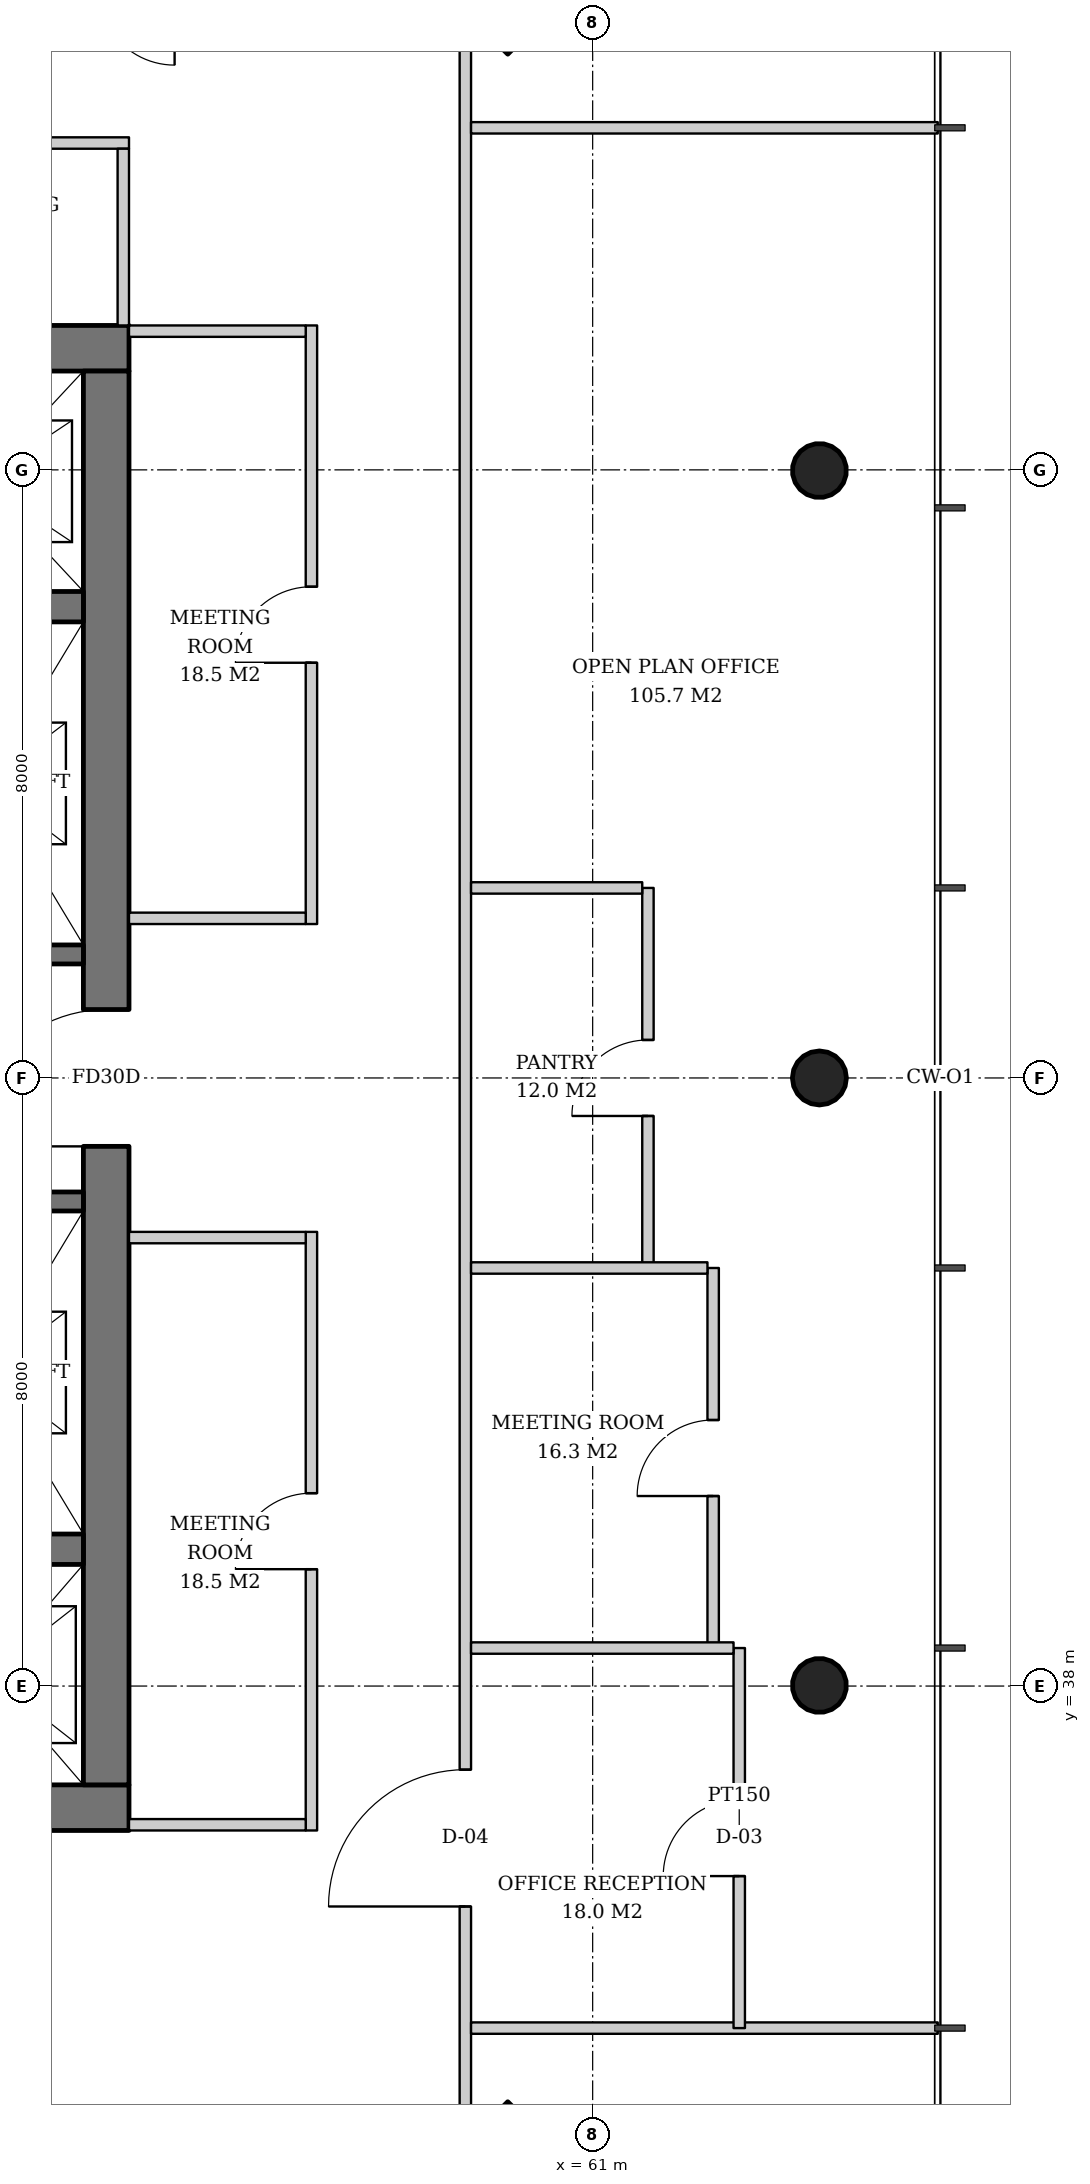
"""IFC4 building model, lengths in metres.
Left out: names, types, materials, properties, quantities, classifications, styles, units other than length and angle.
Written with IfcOpenShell. Run it as: python <this file> out.ifc"""

import sys

from ifc_helpers import new_model, si_unit, direction, frame, frame_2d, origin, origin_2d, place, context, subcontext, project, spatial, rectangle, hollow_circle, extrude, element, fill, save


model = new_model("IFC4")
c1 = context("Model", 3, precision=1e-05, world=origin(), true_north=direction((0.0, 1.0)))
c2 = subcontext(c1, "Body", "Model", "MODEL_VIEW")
j1 = project(units=[si_unit("LENGTHUNIT", "METRE"), si_unit("PLANEANGLEUNIT", "RADIAN")], contexts=[c1])
p1 = place(None, origin())
s1 = spatial("IfcSite", under=j1, at=p1, CompositionType="ELEMENT")
p2 = place(p1, origin())
s2 = spatial("IfcBuilding", under=s1, at=p2, CompositionType="ELEMENT")
p3 = place(p2, frame((0.0, 0.0, 176.8)))
s3 = spatial("IfcBuildingStorey", under=s2, at=p3, CompositionType="ELEMENT", Elevation=176.8)
p4 = place(p3, frame((59.921, 60.921, 0.0), z_axis=(-0.031898107953, -0.031898107953, 0.998981992539), x_axis=(0.707106781187, -0.707106781187, 0.0)))
e1 = element("IfcColumn", 1, at=p4, inside=s3, PredefinedType="COLUMN", context=c2, shape_type="SweptSolid", body=[
    extrude(rectangle(XDim=2.0, YDim=2.0, at=origin_2d()), origin(), (0.0, 0.0, 1.0), 3.804),
])
p5 = place(p3, frame((64.021, 37.989, 0.0), z_axis=(-0.031974409754, 0.015987204877, 0.999360818924), x_axis=(-0.4472135955, -0.894427191, 0.0)))
e2 = element("IfcColumn", 2, at=p5, inside=s3, PredefinedType="COLUMN", context=c2, shape_type="SweptSolid", body=[
    extrude(hollow_circle(Radius=0.355, WallThickness=0.025, at=origin_2d()), origin(), (0.0, 0.0, 1.0), 3.802),
])
p6 = place(p3, frame((64.021, 46.0, 0.0), z_axis=(-0.031978496719, 0.0, 0.999488557087), x_axis=(0.0, -1.0, 0.0)))
e3 = element("IfcColumn", 3, at=p6, inside=s3, PredefinedType="COLUMN", context=c2, shape_type="SweptSolid", body=[
    extrude(hollow_circle(Radius=0.355, WallThickness=0.025, at=origin_2d()), origin(), (0.0, 0.0, 1.0), 3.802),
])
p7 = place(p3, frame((64.021, 54.011, 0.0), z_axis=(-0.031974409754, -0.015987204877, 0.999360818924), x_axis=(0.4472135955, -0.894427191, 0.0)))
e4 = element("IfcColumn", 4, at=p7, inside=s3, PredefinedType="COLUMN", context=c2, shape_type="SweptSolid", body=[
    extrude(hollow_circle(Radius=0.355, WallThickness=0.025, at=origin_2d()), origin(), (0.0, 0.0, 1.0), 3.802),
])
p8 = place(p3, frame((59.921, 31.079, 0.0), z_axis=(-0.031898107953, 0.031898107953, 0.998981992539), x_axis=(-0.707106781187, -0.707106781187, 0.0)))
e5 = element("IfcColumn", 5, at=p8, inside=s3, PredefinedType="COLUMN", context=c2, shape_type="SweptSolid", body=[
    extrude(rectangle(XDim=2.0, YDim=2.0, at=origin_2d()), origin(), (0.0, 0.0, 1.0), 3.804),
])
p9 = place(p3, frame((35.1, 36.4, 0.0), z_axis=(0.0, 0.0, 1.0), x_axis=(1.0, 0.0, 0.0)))
e6 = element("IfcWall", 6, at=p9, inside=s3, PredefinedType="SHEAR", context=c2, shape_type="SweptSolid", body=[
    extrude(rectangle(XDim=19.8, YDim=0.6, at=frame_2d((9.9, 0.0))), origin(), (0.0, 0.0, 1.0), 3.8),
])
p10 = place(p9, frame((3.9, 0.0, 0.0)))
e7 = element("IfcOpeningElement", 7, at=p10, cuts=e6, PredefinedType="OPENING", context=c2, shape_type="SweptSolid", body=[
    extrude(rectangle(XDim=1.0, YDim=2.1, at=frame_2d((0.5, 1.05))), frame((0.0, 0.31, 0.0), z_axis=(0.0, -1.0, 0.0), x_axis=(1.0, 0.0, 0.0)), (0.0, 0.0, 1.0), 0.62),
])
p11 = place(p9, frame((15.35, 0.0, 0.0)))
e8 = element("IfcOpeningElement", 8, at=p11, cuts=e6, PredefinedType="OPENING", context=c2, shape_type="SweptSolid", body=[
    extrude(rectangle(XDim=1.0, YDim=2.1, at=frame_2d((0.5, 1.05))), frame((0.0, 0.31, 0.0), z_axis=(0.0, -1.0, 0.0), x_axis=(1.0, 0.0, 0.0)), (0.0, 0.0, 1.0), 0.62),
])
p12 = place(p3, frame((35.1, 55.6, 0.0), z_axis=(0.0, 0.0, 1.0), x_axis=(1.0, 0.0, 0.0)))
e9 = element("IfcWall", 9, at=p12, inside=s3, PredefinedType="SHEAR", context=c2, shape_type="SweptSolid", body=[
    extrude(rectangle(XDim=19.8, YDim=0.6, at=frame_2d((9.9, 0.0))), origin(), (0.0, 0.0, 1.0), 3.8),
])
p13 = place(p12, frame((14.54, 0.0, 0.0)))
e10 = element("IfcOpeningElement", 10, at=p13, cuts=e9, PredefinedType="OPENING", context=c2, shape_type="SweptSolid", body=[
    extrude(rectangle(XDim=1.0, YDim=2.1, at=frame_2d((0.5, 1.05))), frame((0.0, 0.31, 0.0), z_axis=(0.0, -1.0, 0.0), x_axis=(1.0, 0.0, 0.0)), (0.0, 0.0, 1.0), 0.62),
])
p14 = place(p12, frame((1.024, 0.0, 0.0)))
e11 = element("IfcOpeningElement", 11, at=p14, cuts=e9, PredefinedType="OPENING", context=c2, shape_type="SweptSolid", body=[
    extrude(rectangle(XDim=1.0, YDim=2.1, at=frame_2d((0.5, 1.05))), frame((0.0, 0.31, 0.0), z_axis=(0.0, -1.0, 0.0), x_axis=(1.0, 0.0, 0.0)), (0.0, 0.0, 1.0), 0.62),
])
p15 = place(p12, frame((3.262, 0.0, 0.0)))
e12 = element("IfcOpeningElement", 12, at=p15, cuts=e9, PredefinedType="OPENING", context=c2, shape_type="SweptSolid", body=[
    extrude(rectangle(XDim=1.0, YDim=2.1, at=frame_2d((0.5, 1.05))), frame((0.0, 0.31, 0.0), z_axis=(0.0, -1.0, 0.0), x_axis=(1.0, 0.0, 0.0)), (0.0, 0.0, 1.0), 0.62),
])
p16 = place(p3, frame((54.6, 36.7, 0.0), z_axis=(0.0, 0.0, 1.0), x_axis=(0.0, 1.0, 0.0)))
e13 = element("IfcWall", 13, at=p16, inside=s3, PredefinedType="SHEAR", context=c2, shape_type="SweptSolid", body=[
    extrude(rectangle(XDim=18.6, YDim=0.6, at=frame_2d((9.3, 0.0))), origin(), (0.0, 0.0, 1.0), 3.8),
])
p17 = place(p16, frame((8.4, 0.0, 0.0)))
e14 = element("IfcOpeningElement", 14, at=p17, cuts=e13, PredefinedType="OPENING", context=c2, shape_type="SweptSolid", body=[
    extrude(rectangle(XDim=1.8, YDim=2.4, at=frame_2d((0.9, 1.2))), frame((0.0, 0.31, 0.0), z_axis=(0.0, -1.0, 0.0), x_axis=(1.0, 0.0, 0.0)), (0.0, 0.0, 1.0), 0.62),
])
for number, where, z_axis, x_axis in (
    (15, (35.7, 39.8, 0.0), (0.0, 0.0, 1.0), (1.0, 0.0, 0.0)),
    (16, (35.7, 52.2, 0.0), (0.0, 0.0, 1.0), (1.0, 0.0, 0.0)),
):
    element("IfcWall", number, at=place(p3, frame(where, z_axis=z_axis, x_axis=x_axis)), inside=s3, PredefinedType="SHEAR", context=c2, shape_type="SweptSolid", body=[
        extrude(rectangle(XDim=18.6, YDim=0.4, at=frame_2d((9.3, 0.0))), origin(), (0.0, 0.0, 1.0), 3.8),
    ])
for number, where, z_axis, x_axis in (
    (17, (48.93, 47.625, 0.0), (0.0, 0.0, 1.0), (1.0, 0.0, 0.0)),
    (18, (48.93, 44.375, 0.0), (0.0, 0.0, 1.0), (1.0, 0.0, 0.0)),
):
    element("IfcWall", number, at=place(p3, frame(where, z_axis=z_axis, x_axis=x_axis)), inside=s3, PredefinedType="SHEAR", context=c2, shape_type="SweptSolid", body=[
        extrude(rectangle(XDim=5.37, YDim=0.25, at=frame_2d((2.685, 0.0))), origin(), (0.0, 0.0, 1.0), 3.8),
    ])
p18 = place(p3, frame((57.3, 36.1, 0.0), z_axis=(0.0, 0.0, 1.0), x_axis=(0.0, 1.0, 0.0)))
e19 = element("IfcWall", 19, at=p18, inside=s3, PredefinedType="PARTITIONING", context=c2, shape_type="SweptSolid", body=[
    extrude(rectangle(XDim=7.875, YDim=0.15, at=frame_2d((3.938, 0.0))), origin(), (0.0, 0.0, 1.0), 2.867),
])
p19 = place(p18, frame((3.438, 0.0, 0.0)))
e20 = element("IfcOpeningElement", 20, at=p19, cuts=e19, PredefinedType="OPENING", context=c2, shape_type="SweptSolid", body=[
    extrude(rectangle(XDim=1.0, YDim=2.1, at=frame_2d((0.5, 1.05))), frame((0.0, 0.085, 0.0), z_axis=(0.0, -1.0, 0.0), x_axis=(1.0, 0.0, 0.0)), (0.0, 0.0, 1.0), 0.17),
])
p20 = place(p3, frame((54.9, 36.175, 0.0), z_axis=(0.0, 0.0, 1.0), x_axis=(1.0, 0.0, 0.0)))
e21 = element("IfcWall", 21, at=p20, inside=s3, PredefinedType="PARTITIONING", context=c2, shape_type="SweptSolid", body=[
    extrude(rectangle(XDim=2.325, YDim=0.15, at=frame_2d((1.163, 0.0))), origin(), (0.0, 0.0, 1.0), 2.867),
])
p21 = place(p3, frame((54.9, 43.9, 0.0), z_axis=(0.0, 0.0, 1.0), x_axis=(1.0, 0.0, 0.0)))
e22 = element("IfcWall", 22, at=p21, inside=s3, PredefinedType="PARTITIONING", context=c2, shape_type="SweptSolid", body=[
    extrude(rectangle(XDim=2.325, YDim=0.15, at=frame_2d((1.163, 0.0))), origin(), (0.0, 0.0, 1.0), 3.62),
])
p22 = place(p3, frame((57.3, 48.025, 0.0), z_axis=(0.0, 0.0, 1.0), x_axis=(0.0, 1.0, 0.0)))
e23 = element("IfcWall", 23, at=p22, inside=s3, PredefinedType="PARTITIONING", context=c2, shape_type="SweptSolid", body=[
    extrude(rectangle(XDim=7.875, YDim=0.15, at=frame_2d((3.938, 0.0))), origin(), (0.0, 0.0, 1.0), 2.867),
])
p23 = place(p22, frame((3.438, 0.0, 0.0)))
e24 = element("IfcOpeningElement", 24, at=p23, cuts=e23, PredefinedType="OPENING", context=c2, shape_type="SweptSolid", body=[
    extrude(rectangle(XDim=1.0, YDim=2.1, at=frame_2d((0.5, 1.05))), frame((0.0, 0.085, 0.0), z_axis=(0.0, -1.0, 0.0), x_axis=(1.0, 0.0, 0.0)), (0.0, 0.0, 1.0), 0.17),
])
for number, where, z_axis, x_axis in (
    (25, (54.9, 48.1, 0.0), (0.0, 0.0, 1.0), (1.0, 0.0, 0.0)),
    (26, (54.9, 55.825, 0.0), (0.0, 0.0, 1.0), (1.0, 0.0, 0.0)),
):
    element("IfcWall", number, at=place(p3, frame(where, z_axis=z_axis, x_axis=x_axis)), inside=s3, PredefinedType="PARTITIONING", context=c2, shape_type="SweptSolid", body=[
        extrude(rectangle(XDim=2.325, YDim=0.15, at=frame_2d((1.163, 0.0))), origin(), (0.0, 0.0, 1.0), 3.62),
    ])
p24 = place(p3, frame((54.9, 58.3, 0.0), z_axis=(0.0, 0.0, 1.0), x_axis=(-1.0, 0.0, 0.0)))
e27 = element("IfcWall", 27, at=p24, inside=s3, PredefinedType="PARTITIONING", context=c2, shape_type="SweptSolid", body=[
    extrude(rectangle(XDim=3.135, YDim=0.15, at=frame_2d((1.567, 0.0))), origin(), (0.0, 0.0, 1.0), 2.92),
])
p25 = place(p24, frame((1.067, 0.0, 0.0)))
e28 = element("IfcOpeningElement", 28, at=p25, cuts=e27, PredefinedType="OPENING", context=c2, shape_type="SweptSolid", body=[
    extrude(rectangle(XDim=1.0, YDim=2.1, at=frame_2d((0.5, 1.05))), frame((0.0, 0.085, 0.0), z_axis=(0.0, -1.0, 0.0), x_axis=(1.0, 0.0, 0.0)), (0.0, 0.0, 1.0), 0.17),
])
p26 = place(p3, frame((54.825, 55.9, 0.0), z_axis=(0.0, 0.0, 1.0), x_axis=(0.0, 1.0, 0.0)))
e29 = element("IfcWall", 29, at=p26, inside=s3, PredefinedType="PARTITIONING", context=c2, shape_type="SweptSolid", body=[
    extrude(rectangle(XDim=2.325, YDim=0.15, at=frame_2d((1.163, 0.0))), origin(), (0.0, 0.0, 1.0), 2.867),
])
p27 = place(p3, frame((59.325, 32.214, 0.0), z_axis=(0.0, 0.0, 1.0), x_axis=(0.0, 1.0, 0.0)))
e30 = element("IfcWall", 30, at=p27, inside=s3, PredefinedType="PARTITIONING", context=c2, shape_type="SweptSolid", body=[
    extrude(rectangle(XDim=27.572, YDim=0.15, at=frame_2d((13.786, 0.0))), origin(), (0.0, 0.0, 1.0), 2.867),
])
p28 = place(p27, frame((2.886, 0.0, 0.0)))
e31 = element("IfcOpeningElement", 31, at=p28, cuts=e30, PredefinedType="OPENING", context=c2, shape_type="SweptSolid", body=[
    extrude(rectangle(XDim=1.8, YDim=2.4, at=frame_2d((0.9, 1.2))), frame((0.0, 0.085, 0.0), z_axis=(0.0, -1.0, 0.0), x_axis=(1.0, 0.0, 0.0)), (0.0, 0.0, 1.0), 0.17),
])
for number, where, z_axis, x_axis in (
    (32, (59.4, 33.5, 0.0), (0.0, 0.0, 1.0), (1.0, 0.0, 0.0)),
    (33, (59.4, 58.5, 0.0), (0.0, 0.0, 1.0), (1.0, 0.0, 0.0)),
):
    element("IfcWall", number, at=place(p3, frame(where, z_axis=z_axis, x_axis=x_axis)), inside=s3, PredefinedType="PARTITIONING", context=c2, shape_type="SweptSolid", body=[
        extrude(rectangle(XDim=6.14, YDim=0.15, at=frame_2d((3.07, 0.0))), origin(), (0.0, 0.0, 1.0), 3.12),
    ])
p29 = place(p3, frame((62.928, 33.5, 0.0), z_axis=(0.0, 0.0, 1.0), x_axis=(0.0, 1.0, 0.0)))
e34 = element("IfcWall", 34, at=p29, inside=s3, PredefinedType="PARTITIONING", context=c2, shape_type="SweptSolid", body=[
    extrude(rectangle(XDim=5.0, YDim=0.15, at=frame_2d((2.5, 0.0))), origin(), (0.0, 0.0, 1.0), 2.92),
])
p30 = place(p29, frame((2.0, 0.0, 0.0)))
e35 = element("IfcOpeningElement", 35, at=p30, cuts=e34, PredefinedType="OPENING", context=c2, shape_type="SweptSolid", body=[
    extrude(rectangle(XDim=1.0, YDim=2.1, at=frame_2d((0.5, 1.05))), frame((0.0, 0.085, 0.0), z_axis=(0.0, -1.0, 0.0), x_axis=(1.0, 0.0, 0.0)), (0.0, 0.0, 1.0), 0.17),
])
p31 = place(p3, frame((62.585, 38.5, 0.0), z_axis=(0.0, 0.0, 1.0), x_axis=(0.0, 1.0, 0.0)))
e36 = element("IfcWall", 36, at=p31, inside=s3, PredefinedType="PARTITIONING", context=c2, shape_type="SweptSolid", body=[
    extrude(rectangle(XDim=5.0, YDim=0.15, at=frame_2d((2.5, 0.0))), origin(), (0.0, 0.0, 1.0), 2.867),
])
p32 = place(p31, frame((2.0, 0.0, 0.0)))
e37 = element("IfcOpeningElement", 37, at=p32, cuts=e36, PredefinedType="OPENING", context=c2, shape_type="SweptSolid", body=[
    extrude(rectangle(XDim=1.0, YDim=2.1, at=frame_2d((0.5, 1.05))), frame((0.0, 0.085, 0.0), z_axis=(0.0, -1.0, 0.0), x_axis=(1.0, 0.0, 0.0)), (0.0, 0.0, 1.0), 0.17),
])
p33 = place(p3, frame((61.727, 43.5, 0.0), z_axis=(0.0, 0.0, 1.0), x_axis=(0.0, 1.0, 0.0)))
e38 = element("IfcWall", 38, at=p33, inside=s3, PredefinedType="PARTITIONING", context=c2, shape_type="SweptSolid", body=[
    extrude(rectangle(XDim=5.0, YDim=0.15, at=frame_2d((2.5, 0.0))), origin(), (0.0, 0.0, 1.0), 2.867),
])
p34 = place(p33, frame((2.0, 0.0, 0.0)))
e39 = element("IfcOpeningElement", 39, at=p34, cuts=e38, PredefinedType="OPENING", context=c2, shape_type="SweptSolid", body=[
    extrude(rectangle(XDim=1.0, YDim=2.1, at=frame_2d((0.5, 1.05))), frame((0.0, 0.085, 0.0), z_axis=(0.0, -1.0, 0.0), x_axis=(1.0, 0.0, 0.0)), (0.0, 0.0, 1.0), 0.17),
])
p35 = place(p3, frame((59.4, 38.5, 0.0), z_axis=(0.0, 0.0, 1.0), x_axis=(1.0, 0.0, 0.0)))
e40 = element("IfcWall", 40, at=p35, inside=s3, PredefinedType="PARTITIONING", context=c2, shape_type="SweptSolid", body=[
    extrude(rectangle(XDim=3.454, YDim=0.15, at=frame_2d((1.727, 0.0))), origin(), (0.0, 0.0, 1.0), 3.62),
])
p36 = place(p3, frame((59.4, 43.5, 0.0), z_axis=(0.0, 0.0, 1.0), x_axis=(1.0, 0.0, 0.0)))
e41 = element("IfcWall", 41, at=p36, inside=s3, PredefinedType="PARTITIONING", context=c2, shape_type="SweptSolid", body=[
    extrude(rectangle(XDim=3.11, YDim=0.15, at=frame_2d((1.555, 0.0))), origin(), (0.0, 0.0, 1.0), 3.62),
])
p37 = place(p3, frame((59.4, 48.5, 0.0), z_axis=(0.0, 0.0, 1.0), x_axis=(1.0, 0.0, 0.0)))
e42 = element("IfcWall", 42, at=p37, inside=s3, PredefinedType="PARTITIONING", context=c2, shape_type="SweptSolid", body=[
    extrude(rectangle(XDim=2.252, YDim=0.15, at=frame_2d((1.126, 0.0))), origin(), (0.0, 0.0, 1.0), 2.867),
])
p38 = place(p17, origin())
e43 = element("IfcDoor", 43, at=p38, inside=s3, OperationType="DOUBLE_DOOR_SINGLE_SWING", PredefinedType="DOOR", context=c2, shape_type="SweptSolid", body=[
    extrude(rectangle(XDim=1.8, YDim=2.4, at=frame_2d((0.9, 1.2))), frame((0.0, 0.025, 0.0), z_axis=(0.0, -1.0, 0.0), x_axis=(1.0, 0.0, 0.0)), (0.0, 0.0, 1.0), 0.05),
])
fill(e14, e43)
p39 = place(p19, origin())
e44 = element("IfcDoor", 44, at=p39, inside=s3, OperationType="SINGLE_SWING_LEFT", PredefinedType="DOOR", context=c2, shape_type="SweptSolid", body=[
    extrude(rectangle(XDim=1.0, YDim=2.1, at=frame_2d((0.5, 1.05))), frame((0.0, 0.025, 0.0), z_axis=(0.0, -1.0, 0.0), x_axis=(1.0, 0.0, 0.0)), (0.0, 0.0, 1.0), 0.05),
])
fill(e20, e44)
p40 = place(p23, origin())
e45 = element("IfcDoor", 45, at=p40, inside=s3, OperationType="SINGLE_SWING_LEFT", PredefinedType="DOOR", context=c2, shape_type="SweptSolid", body=[
    extrude(rectangle(XDim=1.0, YDim=2.1, at=frame_2d((0.5, 1.05))), frame((0.0, 0.025, 0.0), z_axis=(0.0, -1.0, 0.0), x_axis=(1.0, 0.0, 0.0)), (0.0, 0.0, 1.0), 0.05),
])
fill(e24, e45)
p41 = place(p28, origin())
e46 = element("IfcDoor", 46, at=p41, inside=s3, OperationType="DOUBLE_DOOR_SINGLE_SWING", PredefinedType="DOOR", context=c2, shape_type="SweptSolid", body=[
    extrude(rectangle(XDim=1.8, YDim=2.4, at=frame_2d((0.9, 1.2))), frame((0.0, 0.025, 0.0), z_axis=(0.0, -1.0, 0.0), x_axis=(1.0, 0.0, 0.0)), (0.0, 0.0, 1.0), 0.05),
])
fill(e31, e46)
p42 = place(p30, origin())
e47 = element("IfcDoor", 47, at=p42, inside=s3, OperationType="SINGLE_SWING_LEFT", PredefinedType="DOOR", context=c2, shape_type="SweptSolid", body=[
    extrude(rectangle(XDim=1.0, YDim=2.1, at=frame_2d((0.5, 1.05))), frame((0.0, 0.025, 0.0), z_axis=(0.0, -1.0, 0.0), x_axis=(1.0, 0.0, 0.0)), (0.0, 0.0, 1.0), 0.05),
])
fill(e35, e47)
p43 = place(p32, origin())
e48 = element("IfcDoor", 48, at=p43, inside=s3, OperationType="SINGLE_SWING_LEFT", PredefinedType="DOOR", context=c2, shape_type="SweptSolid", body=[
    extrude(rectangle(XDim=1.0, YDim=2.1, at=frame_2d((0.5, 1.05))), frame((0.0, 0.025, 0.0), z_axis=(0.0, -1.0, 0.0), x_axis=(1.0, 0.0, 0.0)), (0.0, 0.0, 1.0), 0.05),
])
fill(e37, e48)
p44 = place(p34, origin())
e49 = element("IfcDoor", 49, at=p44, inside=s3, OperationType="SINGLE_SWING_LEFT", PredefinedType="DOOR", context=c2, shape_type="SweptSolid", body=[
    extrude(rectangle(XDim=1.0, YDim=2.1, at=frame_2d((0.5, 1.05))), frame((0.0, 0.025, 0.0), z_axis=(0.0, -1.0, 0.0), x_axis=(1.0, 0.0, 0.0)), (0.0, 0.0, 1.0), 0.05),
])
fill(e39, e49)
save(model, sys.argv[1])
